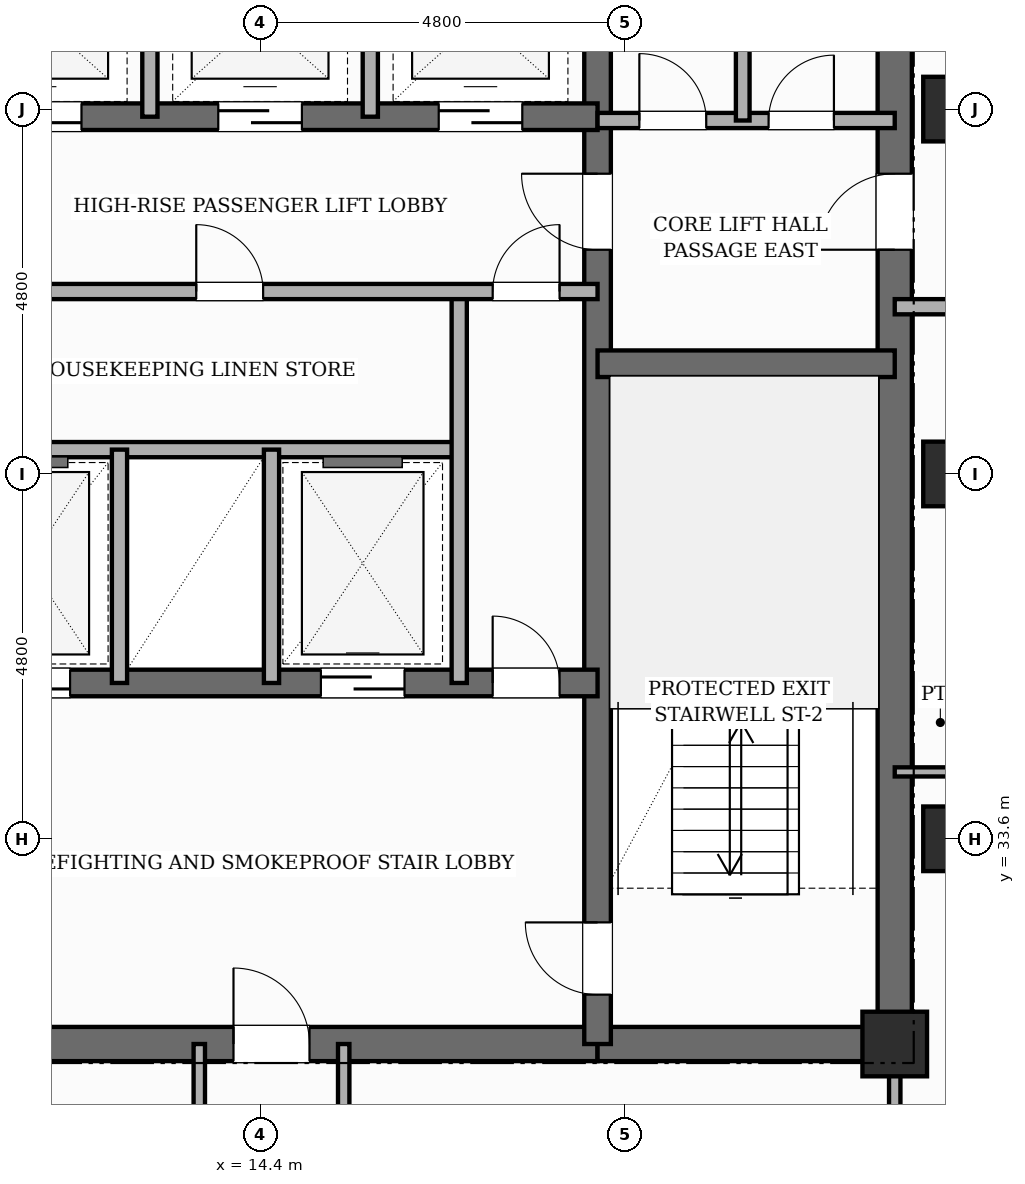
"""IFC4 building model, lengths in metres.
Left out: names, types, materials, properties, quantities, classifications, styles, units other than length and angle.
Written with IfcOpenShell. Run it as: python <this file> out.ifc"""

import sys

from ifc_helpers import new_model, si_unit, direction, frame, frame_2d, origin, origin_2d, place, context, subcontext, project, spatial, rectangle, extrude, element, fill, save


model = new_model("IFC4")
c1 = context("Model", 3, precision=1e-05, world=origin(), true_north=direction((0.0, 1.0)))
c2 = subcontext(c1, "Body", "Model", "MODEL_VIEW")
j1 = project(units=[si_unit("LENGTHUNIT", "METRE"), si_unit("PLANEANGLEUNIT", "RADIAN")], contexts=[c1])
p1 = place(None, origin())
s1 = spatial("IfcSite", under=j1, at=p1, CompositionType="ELEMENT")
p2 = place(p1, origin())
s2 = spatial("IfcBuilding", under=s1, at=p2, CompositionType="ELEMENT")
p3 = place(p2, frame((0.0, 0.0, 203.8)))
s3 = spatial("IfcBuildingStorey", under=s2, at=p3, CompositionType="ELEMENT", Elevation=203.8)
p4 = place(p3, frame((22.75, 30.675, 0.0), z_axis=(0.0, 0.0, 1.0), x_axis=(0.0, 1.0, 0.0)))
e1 = element("IfcWall", 1, at=p4, inside=s3, PredefinedType="SHEAR", context=c2, shape_type="SweptSolid", body=[
    extrude(rectangle(XDim=15.35, YDim=0.45, at=frame_2d((7.675, 0.0))), origin(), (0.0, 0.0, 1.0), 3.6),
])
p5 = place(p4, frame((10.675, 0.0, 0.0)))
e2 = element("IfcOpeningElement", 2, at=p5, cuts=e1, PredefinedType="OPENING", context=c2, shape_type="SweptSolid", body=[
    extrude(rectangle(XDim=1.0, YDim=2.15, at=frame_2d((0.5, 1.075))), frame((0.0, 0.235, 0.0), z_axis=(0.0, -1.0, 0.0), x_axis=(1.0, 0.0, 0.0)), (0.0, 0.0, 1.0), 0.47),
])
p6 = place(p3, frame((9.96, 30.9, 0.0), z_axis=(0.0, 0.0, 1.0), x_axis=(1.0, 0.0, 0.0)))
e3 = element("IfcWall", 3, at=p6, inside=s3, PredefinedType="SHEAR", context=c2, shape_type="SweptSolid", body=[
    extrude(rectangle(XDim=8.88, YDim=0.45, at=frame_2d((4.44, 0.0))), origin(), (0.0, 0.0, 1.0), 3.6),
])
p7 = place(p6, frame((4.09, 0.0, 0.0)))
e4 = element("IfcOpeningElement", 4, at=p7, cuts=e3, PredefinedType="OPENING", context=c2, shape_type="SweptSolid", body=[
    extrude(rectangle(XDim=1.0, YDim=2.15, at=frame_2d((0.5, 1.075))), frame((0.0, 0.235, 0.0), z_axis=(0.0, -1.0, 0.0), x_axis=(1.0, 0.0, 0.0)), (0.0, 0.0, 1.0), 0.47),
])
p8 = place(p3, frame((18.84, 30.9, 0.0), z_axis=(0.0, 0.0, 1.0), x_axis=(1.0, 0.0, 0.0)))
e5 = element("IfcWall", 5, at=p8, inside=s3, PredefinedType="SHEAR", context=c2, shape_type="SweptSolid", body=[
    extrude(rectangle(XDim=3.91, YDim=0.45, at=frame_2d((1.955, 0.0))), origin(), (0.0, 0.0, 1.0), 3.6),
])
p9 = place(p3, frame((18.84, 30.9, 0.0), z_axis=(0.0, 0.0, 1.0), x_axis=(0.0, 1.0, 0.0)))
e6 = element("IfcWall", 6, at=p9, inside=s3, PredefinedType="SHEAR", context=c2, shape_type="SweptSolid", body=[
    extrude(rectangle(XDim=14.9, YDim=0.35, at=frame_2d((7.45, 0.0))), origin(), (0.0, 0.0, 1.0), 3.6),
])
p10 = place(p9, frame((0.65, 0.0, 0.0)))
e7 = element("IfcOpeningElement", 7, at=p10, cuts=e6, PredefinedType="OPENING", context=c2, shape_type="SweptSolid", body=[
    extrude(rectangle(XDim=0.95, YDim=2.1, at=frame_2d((0.475, 1.05))), frame((0.0, 0.185, 0.0), z_axis=(0.0, -1.0, 0.0), x_axis=(1.0, 0.0, 0.0)), (0.0, 0.0, 1.0), 0.37),
])
p11 = place(p9, frame((10.45, 0.0, 0.0)))
e8 = element("IfcOpeningElement", 8, at=p11, cuts=e6, PredefinedType="OPENING", context=c2, shape_type="SweptSolid", body=[
    extrude(rectangle(XDim=1.0, YDim=2.15, at=frame_2d((0.5, 1.075))), frame((0.0, 0.185, 0.0), z_axis=(0.0, -1.0, 0.0), x_axis=(1.0, 0.0, 0.0)), (0.0, 0.0, 1.0), 0.37),
])
p12 = place(p3, frame((18.84, 39.85, 0.0), z_axis=(0.0, 0.0, 1.0), x_axis=(1.0, 0.0, 0.0)))
e9 = element("IfcWall", 9, at=p12, inside=s3, PredefinedType="SHEAR", context=c2, shape_type="SweptSolid", body=[
    extrude(rectangle(XDim=3.91, YDim=0.35, at=frame_2d((1.955, 0.0))), origin(), (0.0, 0.0, 1.0), 3.6),
])
p13 = place(p3, frame((9.96, 35.65, 0.0), z_axis=(0.0, 0.0, 1.0), x_axis=(1.0, 0.0, 0.0)))
e10 = element("IfcWall", 10, at=p13, inside=s3, PredefinedType="SHEAR", context=c2, shape_type="SweptSolid", body=[
    extrude(rectangle(XDim=8.88, YDim=0.35, at=frame_2d((4.44, 0.0))), origin(), (0.0, 0.0, 1.0), 3.6),
])
p14 = place(p13, frame((0.84, 0.0, 0.0)))
e11 = element("IfcOpeningElement", 11, at=p14, cuts=e10, PredefinedType="OPENING", context=c2, shape_type="SweptSolid", body=[
    extrude(rectangle(XDim=1.1, YDim=2.15, at=frame_2d((0.55, 1.075))), frame((0.0, 0.185, 0.0), z_axis=(0.0, -1.0, 0.0), x_axis=(1.0, 0.0, 0.0)), (0.0, 0.0, 1.0), 0.37),
])
p15 = place(p13, frame((5.24, 0.0, 0.0)))
e12 = element("IfcOpeningElement", 12, at=p15, cuts=e10, PredefinedType="OPENING", context=c2, shape_type="SweptSolid", body=[
    extrude(rectangle(XDim=1.1, YDim=2.15, at=frame_2d((0.55, 1.075))), frame((0.0, 0.185, 0.0), z_axis=(0.0, -1.0, 0.0), x_axis=(1.0, 0.0, 0.0)), (0.0, 0.0, 1.0), 0.37),
])
p16 = place(p13, frame((7.5, 0.0, 0.0)))
e13 = element("IfcOpeningElement", 13, at=p16, cuts=e10, PredefinedType="OPENING", context=c2, shape_type="SweptSolid", body=[
    extrude(rectangle(XDim=0.88, YDim=2.1, at=frame_2d((0.44, 1.05))), frame((0.0, 0.185, 0.0), z_axis=(0.0, -1.0, 0.0), x_axis=(1.0, 0.0, 0.0)), (0.0, 0.0, 1.0), 0.37),
])
p17 = place(p3, frame((9.96, 43.1, 0.0), z_axis=(0.0, 0.0, 1.0), x_axis=(1.0, 0.0, 0.0)))
e14 = element("IfcWall", 14, at=p17, inside=s3, PredefinedType="SHEAR", context=c2, shape_type="SweptSolid", body=[
    extrude(rectangle(XDim=8.88, YDim=0.35, at=frame_2d((4.44, 0.0))), origin(), (0.0, 0.0, 1.0), 3.6),
])
p18 = place(p17, frame((0.99, 0.0, 0.0)))
e15 = element("IfcOpeningElement", 15, at=p18, cuts=e14, PredefinedType="OPENING", context=c2, shape_type="SweptSolid", body=[
    extrude(rectangle(XDim=1.1, YDim=2.15, at=frame_2d((0.55, 1.075))), frame((0.0, 0.185, 0.0), z_axis=(0.0, -1.0, 0.0), x_axis=(1.0, 0.0, 0.0)), (0.0, 0.0, 1.0), 0.37),
])
p19 = place(p17, frame((3.89, 0.0, 0.0)))
e16 = element("IfcOpeningElement", 16, at=p19, cuts=e14, PredefinedType="OPENING", context=c2, shape_type="SweptSolid", body=[
    extrude(rectangle(XDim=1.1, YDim=2.15, at=frame_2d((0.55, 1.075))), frame((0.0, 0.185, 0.0), z_axis=(0.0, -1.0, 0.0), x_axis=(1.0, 0.0, 0.0)), (0.0, 0.0, 1.0), 0.37),
])
p20 = place(p17, frame((6.79, 0.0, 0.0)))
e17 = element("IfcOpeningElement", 17, at=p20, cuts=e14, PredefinedType="OPENING", context=c2, shape_type="SweptSolid", body=[
    extrude(rectangle(XDim=1.1, YDim=2.15, at=frame_2d((0.55, 1.075))), frame((0.0, 0.185, 0.0), z_axis=(0.0, -1.0, 0.0), x_axis=(1.0, 0.0, 0.0)), (0.0, 0.0, 1.0), 0.37),
])
for number, where, z_axis, x_axis in (
    (18, (22.75, 30.9, 0.0), (0.0, 0.0, 1.0), (1.0, 0.0, 0.0)),
    (19, (23.55, 33.6, 0.0), (0.0, 0.0, 1.0), (1.0, 0.0, 0.0)),
    (20, (23.55, 38.4, 0.0), (0.0, 0.0, 1.0), (1.0, 0.0, 0.0)),
    (21, (23.55, 43.2, 0.0), (0.0, 0.0, 1.0), (1.0, 0.0, 0.0)),
):
    element("IfcColumn", number, at=place(p3, frame(where, z_axis=z_axis, x_axis=x_axis)), inside=s3, PredefinedType="COLUMN", context=c2, shape_type="SweptSolid", body=[
        extrude(rectangle(XDim=0.85, YDim=0.85, at=origin_2d()), origin(), (0.0, 0.0, 1.0), 3.6),
    ])
p21 = place(p3, frame((9.96, 38.72, 0.0), z_axis=(0.0, 0.0, 1.0), x_axis=(1.0, 0.0, 0.0)))
e22 = element("IfcWall", 22, at=p21, inside=s3, PredefinedType="POLYGONAL", context=c2, shape_type="SweptSolid", body=[
    extrude(rectangle(XDim=7.06, YDim=0.2, at=frame_2d((3.53, 0.0))), origin(), (0.0, 0.0, 1.0), 3.38),
])
for number, where, z_axis, x_axis in (
    (23, (12.55, 35.65, 0.0), (0.0, 0.0, 1.0), (0.0, 1.0, 0.0)),
    (24, (14.55, 35.65, 0.0), (0.0, 0.0, 1.0), (0.0, 1.0, 0.0)),
):
    element("IfcWall", number, at=place(p3, frame(where, z_axis=z_axis, x_axis=x_axis)), inside=s3, PredefinedType="POLYGONAL", context=c2, shape_type="SweptSolid", body=[
        extrude(rectangle(XDim=3.07, YDim=0.2, at=frame_2d((1.535, 0.0))), origin(), (0.0, 0.0, 1.0), 3.38),
    ])
p22 = place(p3, frame((17.02, 35.65, 0.0), z_axis=(0.0, 0.0, 1.0), x_axis=(0.0, 1.0, 0.0)))
e25 = element("IfcWall", 25, at=p22, inside=s3, PredefinedType="POLYGONAL", context=c2, shape_type="SweptSolid", body=[
    extrude(rectangle(XDim=5.15, YDim=0.2, at=frame_2d((2.575, 0.0))), origin(), (0.0, 0.0, 1.0), 3.38),
])
p23 = place(p3, frame((9.96, 40.8, 0.0), z_axis=(0.0, 0.0, 1.0), x_axis=(1.0, 0.0, 0.0)))
e26 = element("IfcWall", 26, at=p23, inside=s3, PredefinedType="POLYGONAL", context=c2, shape_type="SweptSolid", body=[
    extrude(rectangle(XDim=8.88, YDim=0.2, at=frame_2d((4.44, 0.0))), origin(), (0.0, 0.0, 1.0), 3.38),
])
p24 = place(p23, frame((7.5, 0.0, 0.0)))
e27 = element("IfcOpeningElement", 27, at=p24, cuts=e26, PredefinedType="OPENING", context=c2, shape_type="SweptSolid", body=[
    extrude(rectangle(XDim=0.88, YDim=2.1, at=frame_2d((0.44, 1.05))), frame((0.0, 0.11, 0.0), z_axis=(0.0, -1.0, 0.0), x_axis=(1.0, 0.0, 0.0)), (0.0, 0.0, 1.0), 0.22),
])
p25 = place(p23, frame((3.6, 0.0, 0.0)))
e28 = element("IfcOpeningElement", 28, at=p25, cuts=e26, PredefinedType="OPENING", context=c2, shape_type="SweptSolid", body=[
    extrude(rectangle(XDim=0.88, YDim=2.1, at=frame_2d((0.44, 1.05))), frame((0.0, 0.11, 0.0), z_axis=(0.0, -1.0, 0.0), x_axis=(1.0, 0.0, 0.0)), (0.0, 0.0, 1.0), 0.22),
])
p26 = place(p3, frame((18.84, 43.05, 0.0), z_axis=(0.0, 0.0, 1.0), x_axis=(1.0, 0.0, 0.0)))
e29 = element("IfcWall", 29, at=p26, inside=s3, PredefinedType="POLYGONAL", context=c2, shape_type="SweptSolid", body=[
    extrude(rectangle(XDim=3.91, YDim=0.2, at=frame_2d((1.955, 0.0))), origin(), (0.0, 0.0, 1.0), 2.66),
])
p27 = place(p26, frame((0.55, 0.0, 0.0)))
e30 = element("IfcOpeningElement", 30, at=p27, cuts=e29, PredefinedType="OPENING", context=c2, shape_type="SweptSolid", body=[
    extrude(rectangle(XDim=0.88, YDim=2.1, at=frame_2d((0.44, 1.05))), frame((0.0, 0.11, 0.0), z_axis=(0.0, -1.0, 0.0), x_axis=(1.0, 0.0, 0.0)), (0.0, 0.0, 1.0), 0.22),
])
p28 = place(p26, frame((2.25, 0.0, 0.0)))
e31 = element("IfcOpeningElement", 31, at=p28, cuts=e29, PredefinedType="OPENING", context=c2, shape_type="SweptSolid", body=[
    extrude(rectangle(XDim=0.86, YDim=2.1, at=frame_2d((0.43, 1.05))), frame((0.0, 0.11, 0.0), z_axis=(0.0, -1.0, 0.0), x_axis=(1.0, 0.0, 0.0)), (0.0, 0.0, 1.0), 0.22),
])
for number, where, z_axis, x_axis in (
    (32, (12.95, 43.1, 0.0), (0.0, 0.0, 1.0), (0.0, 1.0, 0.0)),
    (33, (15.85, 43.1, 0.0), (0.0, 0.0, 1.0), (0.0, 1.0, 0.0)),
):
    element("IfcWall", number, at=place(p3, frame(where, z_axis=z_axis, x_axis=x_axis)), inside=s3, PredefinedType="POLYGONAL", context=c2, shape_type="SweptSolid", body=[
        extrude(rectangle(XDim=2.55, YDim=0.2, at=frame_2d((1.275, 0.0))), origin(), (0.0, 0.0, 1.0), 3.38),
    ])
p29 = place(p3, frame((20.75, 43.05, 0.0), z_axis=(0.0, 0.0, 1.0), x_axis=(0.0, 1.0, 0.0)))
e34 = element("IfcWall", 34, at=p29, inside=s3, PredefinedType="PLUMBINGWALL", context=c2, shape_type="SweptSolid", body=[
    extrude(rectangle(XDim=2.6, YDim=0.18, at=frame_2d((1.3, 0.0))), origin(), (0.0, 0.0, 1.0), 3.38),
])
p30 = place(p3, frame((13.6, 25.75, 0.0), z_axis=(0.0, 0.0, 1.0), x_axis=(0.0, 1.0, 0.0)))
e35 = element("IfcWall", 35, at=p30, inside=s3, PredefinedType="PARTITIONING", context=c2, shape_type="SweptSolid", body=[
    extrude(rectangle(XDim=5.15, YDim=0.15, at=frame_2d((2.575, 0.0))), origin(), (0.0, 0.0, 1.0), 3.38),
])
p31 = place(p30, frame((1.1, 0.0, 0.0)))
e36 = element("IfcOpeningElement", 36, at=p31, cuts=e35, PredefinedType="OPENING", context=c2, shape_type="SweptSolid", body=[
    extrude(rectangle(XDim=0.95, YDim=2.15, at=frame_2d((0.475, 1.075))), frame((0.0, 0.085, 0.0), z_axis=(0.0, -1.0, 0.0), x_axis=(1.0, 0.0, 0.0)), (0.0, 0.0, 1.0), 0.17),
])
p32 = place(p3, frame((15.5, 25.75, 0.0), z_axis=(0.0, 0.0, 1.0), x_axis=(0.0, 1.0, 0.0)))
e37 = element("IfcWall", 37, at=p32, inside=s3, PredefinedType="PARTITIONING", context=c2, shape_type="SweptSolid", body=[
    extrude(rectangle(XDim=5.15, YDim=0.15, at=frame_2d((2.575, 0.0))), origin(), (0.0, 0.0, 1.0), 3.38),
])
p33 = place(p32, frame((0.65, 0.0, 0.0)))
e38 = element("IfcOpeningElement", 38, at=p33, cuts=e37, PredefinedType="OPENING", context=c2, shape_type="SweptSolid", body=[
    extrude(rectangle(XDim=0.95, YDim=2.15, at=frame_2d((0.475, 1.075))), frame((0.0, 0.085, 0.0), z_axis=(0.0, -1.0, 0.0), x_axis=(1.0, 0.0, 0.0)), (0.0, 0.0, 1.0), 0.17),
])
p34 = place(p32, frame((3.1, 0.0, 0.0)))
e39 = element("IfcOpeningElement", 39, at=p34, cuts=e37, PredefinedType="OPENING", context=c2, shape_type="SweptSolid", body=[
    extrude(rectangle(XDim=0.95, YDim=2.15, at=frame_2d((0.475, 1.075))), frame((0.0, 0.085, 0.0), z_axis=(0.0, -1.0, 0.0), x_axis=(1.0, 0.0, 0.0)), (0.0, 0.0, 1.0), 0.17),
])
p35 = place(p3, frame((22.75, 25.75, 0.0), z_axis=(0.0, 0.0, 1.0), x_axis=(0.0, 1.0, 0.0)))
e40 = element("IfcWall", 40, at=p35, inside=s3, PredefinedType="PARTITIONING", context=c2, shape_type="SweptSolid", body=[
    extrude(rectangle(XDim=5.15, YDim=0.15, at=frame_2d((2.575, 0.0))), origin(), (0.0, 0.0, 1.0), 3.38),
])
p36 = place(p3, frame((22.75, 40.6, 0.0), z_axis=(0.0, 0.0, 1.0), x_axis=(1.0, 0.0, 0.0)))
e41 = element("IfcWall", 41, at=p36, inside=s3, PredefinedType="PARTITIONING", context=c2, shape_type="SweptSolid", body=[
    extrude(rectangle(XDim=3.37, YDim=0.2, at=frame_2d((1.685, 0.0))), origin(), (0.0, 0.0, 1.0), 3.38),
])
p37 = place(p36, frame((0.88, 0.0, 0.0)))
e42 = element("IfcOpeningElement", 42, at=p37, cuts=e41, PredefinedType="OPENING", context=c2, shape_type="SweptSolid", body=[
    extrude(rectangle(XDim=0.86, YDim=2.1, at=frame_2d((0.43, 1.05))), frame((0.0, 0.11, 0.0), z_axis=(0.0, -1.0, 0.0), x_axis=(1.0, 0.0, 0.0)), (0.0, 0.0, 1.0), 0.22),
])
p38 = place(p3, frame((22.75, 34.48, 0.0), z_axis=(0.0, 0.0, 1.0), x_axis=(1.0, 0.0, 0.0)))
e43 = element("IfcWall", 43, at=p38, inside=s3, PredefinedType="PARTITIONING", context=c2, shape_type="SweptSolid", body=[
    extrude(rectangle(XDim=3.37, YDim=0.12, at=frame_2d((1.685, 0.0))), origin(), (0.0, 0.0, 1.0), 3.38),
])
p39 = place(p38, frame((1.55, 0.0, 0.0)))
e44 = element("IfcOpeningElement", 44, at=p39, cuts=e43, PredefinedType="OPENING", context=c2, shape_type="SweptSolid", body=[
    extrude(rectangle(XDim=0.9, YDim=2.15, at=frame_2d((0.45, 1.075))), frame((0.0, 0.07, 0.0), z_axis=(0.0, -1.0, 0.0), x_axis=(1.0, 0.0, 0.0)), (0.0, 0.0, 1.0), 0.14),
])
p40 = place(p10, origin())
e45 = element("IfcDoor", 45, at=p40, inside=s3, OperationType="SINGLE_SWING_RIGHT", PredefinedType="DOOR", context=c2, shape_type="SweptSolid", body=[
    extrude(rectangle(XDim=0.95, YDim=2.1, at=frame_2d((0.475, 1.05))), frame((0.0, 0.025, 0.0), z_axis=(0.0, -1.0, 0.0), x_axis=(1.0, 0.0, 0.0)), (0.0, 0.0, 1.0), 0.05),
])
fill(e7, e45)
p41 = place(p7, origin())
e46 = element("IfcDoor", 46, at=p41, inside=s3, OperationType="SINGLE_SWING_LEFT", PredefinedType="DOOR", context=c2, shape_type="SweptSolid", body=[
    extrude(rectangle(XDim=1.0, YDim=2.15, at=frame_2d((0.5, 1.075))), frame((0.0, 0.025, 0.0), z_axis=(0.0, -1.0, 0.0), x_axis=(1.0, 0.0, 0.0)), (0.0, 0.0, 1.0), 0.05),
])
fill(e4, e46)
p42 = place(p14, origin())
e47 = element("IfcDoor", 47, at=p42, inside=s3, OperationType="SLIDING_TO_LEFT", PredefinedType="DOOR", context=c2, shape_type="SweptSolid", body=[
    extrude(rectangle(XDim=1.1, YDim=2.15, at=frame_2d((0.55, 1.075))), frame((0.0, 0.025, 0.0), z_axis=(0.0, -1.0, 0.0), x_axis=(1.0, 0.0, 0.0)), (0.0, 0.0, 1.0), 0.05),
])
fill(e11, e47)
p43 = place(p15, origin())
e48 = element("IfcDoor", 48, at=p43, inside=s3, OperationType="SLIDING_TO_RIGHT", PredefinedType="DOOR", context=c2, shape_type="SweptSolid", body=[
    extrude(rectangle(XDim=1.1, YDim=2.15, at=frame_2d((0.55, 1.075))), frame((0.0, 0.025, 0.0), z_axis=(0.0, -1.0, 0.0), x_axis=(1.0, 0.0, 0.0)), (0.0, 0.0, 1.0), 0.05),
])
fill(e12, e48)
p44 = place(p16, origin())
e49 = element("IfcDoor", 49, at=p44, inside=s3, OperationType="SINGLE_SWING_LEFT", PredefinedType="DOOR", context=c2, shape_type="SweptSolid", body=[
    extrude(rectangle(XDim=0.88, YDim=2.1, at=frame_2d((0.44, 1.05))), frame((0.0, 0.025, 0.0), z_axis=(0.0, -1.0, 0.0), x_axis=(1.0, 0.0, 0.0)), (0.0, 0.0, 1.0), 0.05),
])
fill(e13, e49)
p45 = place(p24, origin())
e50 = element("IfcDoor", 50, at=p45, inside=s3, OperationType="SINGLE_SWING_RIGHT", PredefinedType="DOOR", context=c2, shape_type="SweptSolid", body=[
    extrude(rectangle(XDim=0.88, YDim=2.1, at=frame_2d((0.44, 1.05))), frame((0.0, 0.025, 0.0), z_axis=(0.0, -1.0, 0.0), x_axis=(1.0, 0.0, 0.0)), (0.0, 0.0, 1.0), 0.05),
])
fill(e27, e50)
p46 = place(p18, origin())
e51 = element("IfcDoor", 51, at=p46, inside=s3, OperationType="SLIDING_TO_LEFT", PredefinedType="DOOR", context=c2, shape_type="SweptSolid", body=[
    extrude(rectangle(XDim=1.1, YDim=2.15, at=frame_2d((0.55, 1.075))), frame((0.0, 0.025, 0.0), z_axis=(0.0, -1.0, 0.0), x_axis=(1.0, 0.0, 0.0)), (0.0, 0.0, 1.0), 0.05),
])
fill(e15, e51)
p47 = place(p19, origin())
e52 = element("IfcDoor", 52, at=p47, inside=s3, OperationType="SLIDING_TO_RIGHT", PredefinedType="DOOR", context=c2, shape_type="SweptSolid", body=[
    extrude(rectangle(XDim=1.1, YDim=2.15, at=frame_2d((0.55, 1.075))), frame((0.0, 0.025, 0.0), z_axis=(0.0, -1.0, 0.0), x_axis=(1.0, 0.0, 0.0)), (0.0, 0.0, 1.0), 0.05),
])
fill(e16, e52)
p48 = place(p20, origin())
e53 = element("IfcDoor", 53, at=p48, inside=s3, OperationType="SLIDING_TO_LEFT", PredefinedType="DOOR", context=c2, shape_type="SweptSolid", body=[
    extrude(rectangle(XDim=1.1, YDim=2.15, at=frame_2d((0.55, 1.075))), frame((0.0, 0.025, 0.0), z_axis=(0.0, -1.0, 0.0), x_axis=(1.0, 0.0, 0.0)), (0.0, 0.0, 1.0), 0.05),
])
fill(e17, e53)
p49 = place(p11, origin())
e54 = element("IfcDoor", 54, at=p49, inside=s3, OperationType="SINGLE_SWING_RIGHT", PredefinedType="DOOR", context=c2, shape_type="SweptSolid", body=[
    extrude(rectangle(XDim=1.0, YDim=2.15, at=frame_2d((0.5, 1.075))), frame((0.0, 0.025, 0.0), z_axis=(0.0, -1.0, 0.0), x_axis=(1.0, 0.0, 0.0)), (0.0, 0.0, 1.0), 0.05),
])
fill(e8, e54)
p50 = place(p5, origin())
e55 = element("IfcDoor", 55, at=p50, inside=s3, OperationType="SINGLE_SWING_LEFT", PredefinedType="DOOR", context=c2, shape_type="SweptSolid", body=[
    extrude(rectangle(XDim=1.0, YDim=2.15, at=frame_2d((0.5, 1.075))), frame((0.0, 0.025, 0.0), z_axis=(0.0, -1.0, 0.0), x_axis=(1.0, 0.0, 0.0)), (0.0, 0.0, 1.0), 0.05),
])
fill(e2, e55)
p51 = place(p25, origin())
e56 = element("IfcDoor", 56, at=p51, inside=s3, OperationType="SINGLE_SWING_LEFT", PredefinedType="DOOR", context=c2, shape_type="SweptSolid", body=[
    extrude(rectangle(XDim=0.88, YDim=2.1, at=frame_2d((0.44, 1.05))), frame((0.0, 0.025, 0.0), z_axis=(0.0, -1.0, 0.0), x_axis=(1.0, 0.0, 0.0)), (0.0, 0.0, 1.0), 0.05),
])
fill(e28, e56)
p52 = place(p27, origin())
e57 = element("IfcDoor", 57, at=p52, inside=s3, OperationType="SINGLE_SWING_LEFT", PredefinedType="DOOR", context=c2, shape_type="SweptSolid", body=[
    extrude(rectangle(XDim=0.88, YDim=2.1, at=frame_2d((0.44, 1.05))), frame((0.0, 0.025, 0.0), z_axis=(0.0, -1.0, 0.0), x_axis=(1.0, 0.0, 0.0)), (0.0, 0.0, 1.0), 0.05),
])
fill(e30, e57)
p53 = place(p28, origin())
e58 = element("IfcDoor", 58, at=p53, inside=s3, OperationType="SINGLE_SWING_RIGHT", PredefinedType="DOOR", context=c2, shape_type="SweptSolid", body=[
    extrude(rectangle(XDim=0.86, YDim=2.1, at=frame_2d((0.43, 1.05))), frame((0.0, 0.025, 0.0), z_axis=(0.0, -1.0, 0.0), x_axis=(1.0, 0.0, 0.0)), (0.0, 0.0, 1.0), 0.05),
])
fill(e31, e58)
save(model, sys.argv[1])
